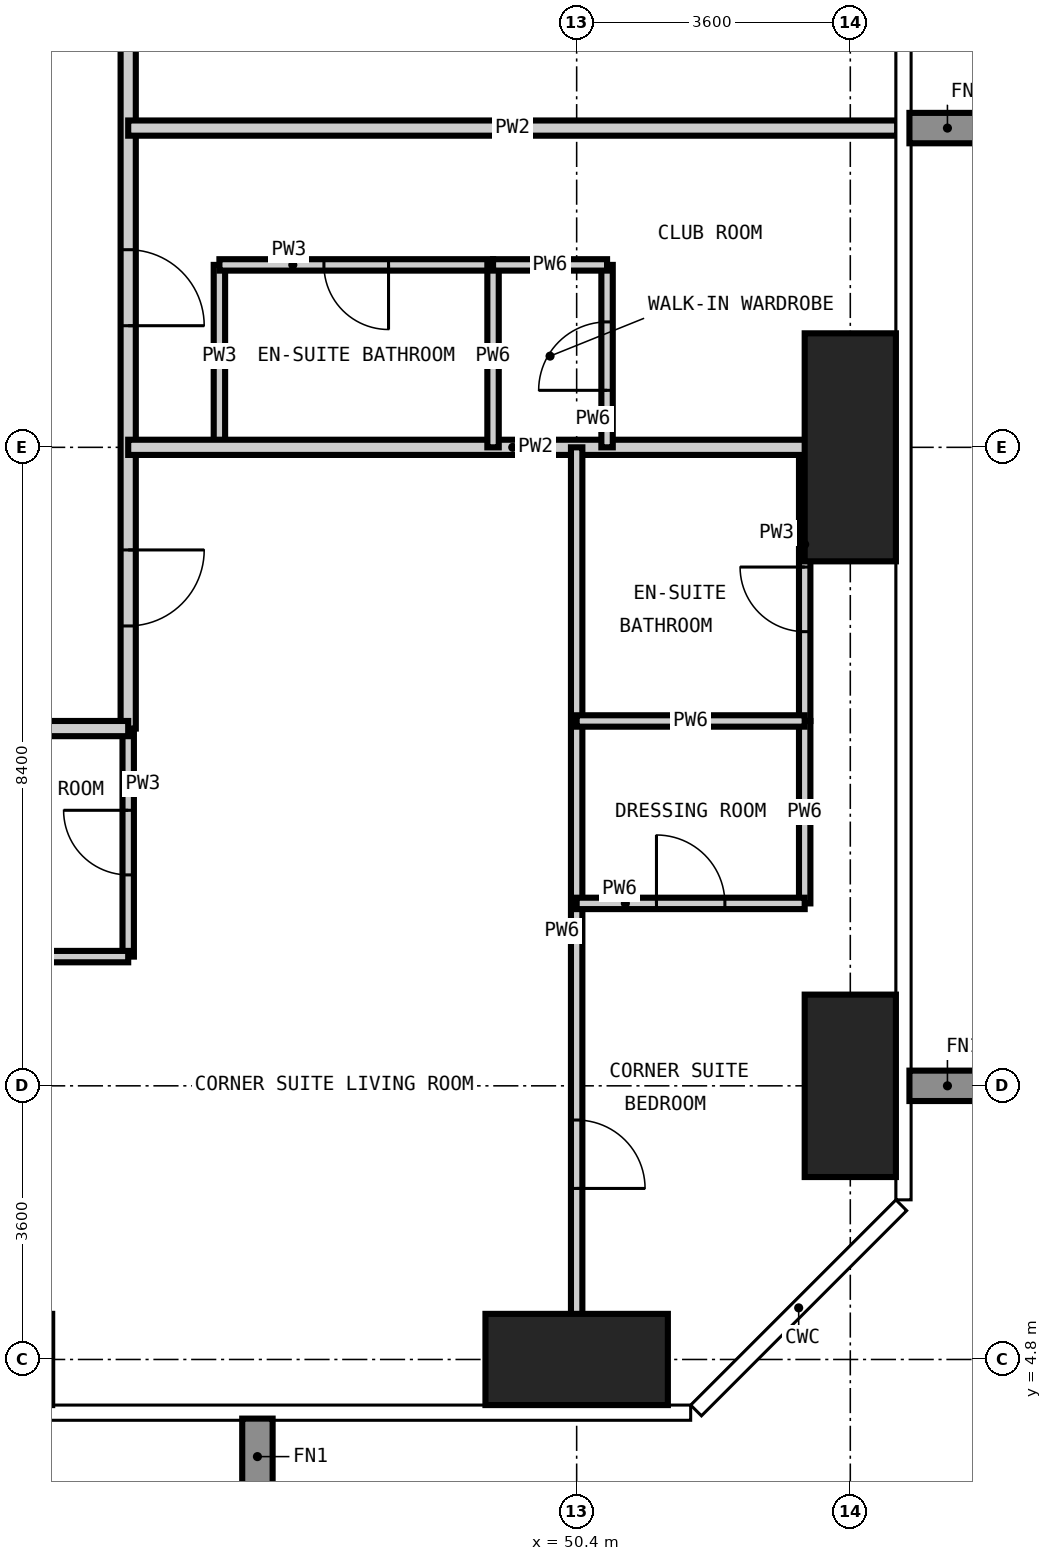
"""IFC4 building model, lengths in metres.
Left out: names, types, materials, properties, quantities, classifications, styles, units other than length and angle.
Written with IfcOpenShell. Run it as: python <this file> out.ifc"""

import sys

from ifc_helpers import new_model, si_unit, direction, frame, frame_2d, origin, origin_2d, place, context, subcontext, project, spatial, rectangle, extrude, element, fill, save


model = new_model("IFC4")
c1 = context("Model", 3, precision=1e-05, world=origin(), true_north=direction((0.0, 1.0)))
c2 = subcontext(c1, "Body", "Model", "MODEL_VIEW")
j1 = project(units=[si_unit("LENGTHUNIT", "METRE"), si_unit("PLANEANGLEUNIT", "RADIAN")], contexts=[c1])
p1 = place(None, origin())
s1 = spatial("IfcSite", under=j1, at=p1, CompositionType="ELEMENT")
p2 = place(p1, origin())
s2 = spatial("IfcBuilding", under=s1, at=p2, CompositionType="ELEMENT")
p3 = place(p2, frame((0.0, 0.0, 216.6)))
s3 = spatial("IfcBuildingStorey", under=s2, at=p3, CompositionType="ELEMENT", Elevation=216.6)
p4 = place(p3, frame((50.4, 4.8, -0.35), z_axis=(0.0, 0.0, 1.0), x_axis=(1.0, 0.0, 0.0)))
e1 = element("IfcColumn", 1, at=p4, inside=s3, PredefinedType="COLUMN", context=c2, shape_type="SweptSolid", body=[
    extrude(rectangle(XDim=2.4, YDim=1.2, at=origin_2d()), origin(), (0.0, 0.0, 1.0), 3.55),
])
p5 = place(p3, frame((54.0, 8.4, -0.35), z_axis=(0.0, 0.0, 1.0), x_axis=(1.0, 0.0, 0.0)))
e2 = element("IfcColumn", 2, at=p5, inside=s3, PredefinedType="COLUMN", context=c2, shape_type="SweptSolid", body=[
    extrude(rectangle(XDim=1.2, YDim=2.4, at=origin_2d()), origin(), (0.0, 0.0, 1.0), 3.55),
])
p6 = place(p3, frame((54.0, 16.8, -0.35), z_axis=(0.0, 0.0, 1.0), x_axis=(1.0, 0.0, 0.0)))
e3 = element("IfcColumn", 3, at=p6, inside=s3, PredefinedType="COLUMN", context=c2, shape_type="SweptSolid", body=[
    extrude(rectangle(XDim=1.2, YDim=3.0, at=origin_2d()), origin(), (0.0, 0.0, 1.0), 3.55),
])
p7 = place(p3, frame((44.5, 10.1, 0.0), z_axis=(0.0, 0.0, 1.0), x_axis=(0.0, 1.0, 0.0)))
e4 = element("IfcWall", 4, at=p7, inside=s3, PredefinedType="PARTITIONING", context=c2, shape_type="SweptSolid", body=[
    extrude(rectangle(XDim=3.0, YDim=0.15, at=frame_2d((1.5, 0.0))), origin(), (0.0, 0.0, 1.0), 3.2),
])
p8 = place(p7, frame((1.075, 0.0, 0.0)))
e5 = element("IfcOpeningElement", 5, at=p8, cuts=e4, PredefinedType="OPENING", context=c2, shape_type="SweptSolid", body=[
    extrude(rectangle(XDim=0.85, YDim=2.1, at=frame_2d((0.425, 1.05))), frame((0.0, 0.085, 0.0), z_axis=(0.0, -1.0, 0.0), x_axis=(1.0, 0.0, 0.0)), (0.0, 0.0, 1.0), 0.17),
])
p9 = place(p3, frame((45.7, 16.8, 0.0), z_axis=(0.0, 0.0, 1.0), x_axis=(0.0, 1.0, 0.0)))
e6 = element("IfcWall", 6, at=p9, inside=s3, PredefinedType="PARTITIONING", context=c2, shape_type="SweptSolid", body=[
    extrude(rectangle(XDim=2.4, YDim=0.15, at=frame_2d((1.2, 0.0))), origin(), (0.0, 0.0, 1.0), 3.2),
])
p10 = place(p3, frame((53.4, 13.2, 0.0), z_axis=(0.0, 0.0, 1.0), x_axis=(0.0, 1.0, 0.0)))
e7 = element("IfcWall", 7, at=p10, inside=s3, PredefinedType="PARTITIONING", context=c2, shape_type="SweptSolid", body=[
    extrude(rectangle(XDim=3.6, YDim=0.15, at=frame_2d((1.8, 0.0))), origin(), (0.0, 0.0, 1.0), 3.2),
])
p11 = place(p10, frame((1.175, 0.0, 0.0)))
e8 = element("IfcOpeningElement", 8, at=p11, cuts=e7, PredefinedType="OPENING", context=c2, shape_type="SweptSolid", body=[
    extrude(rectangle(XDim=0.85, YDim=2.1, at=frame_2d((0.425, 1.05))), frame((0.0, 0.085, 0.0), z_axis=(0.0, -1.0, 0.0), x_axis=(1.0, 0.0, 0.0)), (0.0, 0.0, 1.0), 0.17),
])
p12 = place(p3, frame((42.0, 10.1, 0.0), z_axis=(0.0, 0.0, 1.0), x_axis=(1.0, 0.0, 0.0)))
e9 = element("IfcWall", 9, at=p12, inside=s3, PredefinedType="PARTITIONING", context=c2, shape_type="SweptSolid", body=[
    extrude(rectangle(XDim=2.5, YDim=0.15, at=frame_2d((1.25, 0.0))), origin(), (0.0, 0.0, 1.0), 3.2),
])
p13 = place(p3, frame((45.7, 19.2, 0.0), z_axis=(0.0, 0.0, 1.0), x_axis=(1.0, 0.0, 0.0)))
e10 = element("IfcWall", 10, at=p13, inside=s3, PredefinedType="PARTITIONING", context=c2, shape_type="SweptSolid", body=[
    extrude(rectangle(XDim=3.6, YDim=0.15, at=frame_2d((1.8, 0.0))), origin(), (0.0, 0.0, 1.0), 3.2),
])
p14 = place(p13, frame((1.375, 0.0, 0.0)))
e11 = element("IfcOpeningElement", 11, at=p14, cuts=e10, PredefinedType="OPENING", context=c2, shape_type="SweptSolid", body=[
    extrude(rectangle(XDim=0.85, YDim=2.1, at=frame_2d((0.425, 1.05))), frame((0.0, 0.085, 0.0), z_axis=(0.0, -1.0, 0.0), x_axis=(1.0, 0.0, 0.0)), (0.0, 0.0, 1.0), 0.17),
])
p15 = place(p3, frame((44.5, 45.1, 0.0), z_axis=(0.0, 0.0, 1.0), x_axis=(0.0, -1.0, 0.0)))
e12 = element("IfcWall", 12, at=p15, inside=s3, PredefinedType="PARTITIONING", context=c2, shape_type="SweptSolid", body=[
    extrude(rectangle(XDim=32.0, YDim=0.2, at=frame_2d((16.0, 0.0))), origin(), (0.0, 0.0, 1.0), 3.2),
])
p16 = place(p15, frame((25.7, 0.0, 0.0)))
e13 = element("IfcOpeningElement", 13, at=p16, cuts=e12, PredefinedType="OPENING", context=c2, shape_type="SweptSolid", body=[
    extrude(rectangle(XDim=1.0, YDim=2.2, at=frame_2d((0.5, 1.1))), frame((0.0, 0.11, 0.0), z_axis=(0.0, -1.0, 0.0), x_axis=(1.0, 0.0, 0.0)), (0.0, 0.0, 1.0), 0.22),
])
p17 = place(p15, frame((19.4, 0.0, 0.0)))
e14 = element("IfcOpeningElement", 14, at=p17, cuts=e12, PredefinedType="OPENING", context=c2, shape_type="SweptSolid", body=[
    extrude(rectangle(XDim=1.0, YDim=2.2, at=frame_2d((0.5, 1.1))), frame((0.0, 0.11, 0.0), z_axis=(0.0, -1.0, 0.0), x_axis=(1.0, 0.0, 0.0)), (0.0, 0.0, 1.0), 0.22),
])
p18 = place(p15, frame((11.0, 0.0, 0.0)))
e15 = element("IfcOpeningElement", 15, at=p18, cuts=e12, PredefinedType="OPENING", context=c2, shape_type="SweptSolid", body=[
    extrude(rectangle(XDim=1.0, YDim=2.2, at=frame_2d((0.5, 1.1))), frame((0.0, 0.11, 0.0), z_axis=(0.0, -1.0, 0.0), x_axis=(1.0, 0.0, 0.0)), (0.0, 0.0, 1.0), 0.22),
])
p19 = place(p15, frame((4.7, 0.0, 0.0)))
e16 = element("IfcOpeningElement", 16, at=p19, cuts=e12, PredefinedType="OPENING", context=c2, shape_type="SweptSolid", body=[
    extrude(rectangle(XDim=1.0, YDim=2.2, at=frame_2d((0.5, 1.1))), frame((0.0, 0.11, 0.0), z_axis=(0.0, -1.0, 0.0), x_axis=(1.0, 0.0, 0.0)), (0.0, 0.0, 1.0), 0.22),
])
p20 = place(p15, frame((29.65, 0.0, 0.0)))
e17 = element("IfcOpeningElement", 17, at=p20, cuts=e12, PredefinedType="OPENING", context=c2, shape_type="SweptSolid", body=[
    extrude(rectangle(XDim=1.0, YDim=2.2, at=frame_2d((0.5, 1.1))), frame((0.0, 0.11, 0.0), z_axis=(0.0, -1.0, 0.0), x_axis=(1.0, 0.0, 0.0)), (0.0, 0.0, 1.0), 0.22),
])
p21 = place(p15, frame((1.05, 0.0, 0.0)))
e18 = element("IfcOpeningElement", 18, at=p21, cuts=e12, PredefinedType="OPENING", context=c2, shape_type="SweptSolid", body=[
    extrude(rectangle(XDim=1.0, YDim=2.2, at=frame_2d((0.5, 1.1))), frame((0.0, 0.11, 0.0), z_axis=(0.0, -1.0, 0.0), x_axis=(1.0, 0.0, 0.0)), (0.0, 0.0, 1.0), 0.22),
])
p22 = place(p3, frame((44.5, 13.1, 0.0), z_axis=(0.0, 0.0, 1.0), x_axis=(-1.0, 0.0, 0.0)))
e19 = element("IfcWall", 19, at=p22, inside=s3, PredefinedType="PARTITIONING", context=c2, shape_type="SweptSolid", body=[
    extrude(rectangle(XDim=31.4, YDim=0.2, at=frame_2d((15.7, 0.0))), origin(), (0.0, 0.0, 1.0), 3.2),
])
p23 = place(p22, frame((24.2, 0.0, 0.0)))
e20 = element("IfcOpeningElement", 20, at=p23, cuts=e19, PredefinedType="OPENING", context=c2, shape_type="SweptSolid", body=[
    extrude(rectangle(XDim=1.0, YDim=2.2, at=frame_2d((0.5, 1.1))), frame((0.0, 0.11, 0.0), z_axis=(0.0, -1.0, 0.0), x_axis=(1.0, 0.0, 0.0)), (0.0, 0.0, 1.0), 0.22),
])
p24 = place(p22, frame((13.4, 0.0, 0.0)))
e21 = element("IfcOpeningElement", 21, at=p24, cuts=e19, PredefinedType="OPENING", context=c2, shape_type="SweptSolid", body=[
    extrude(rectangle(XDim=1.0, YDim=2.2, at=frame_2d((0.5, 1.1))), frame((0.0, 0.11, 0.0), z_axis=(0.0, -1.0, 0.0), x_axis=(1.0, 0.0, 0.0)), (0.0, 0.0, 1.0), 0.22),
])
p25 = place(p22, frame((7.4, 0.0, 0.0)))
e22 = element("IfcOpeningElement", 22, at=p25, cuts=e19, PredefinedType="OPENING", context=c2, shape_type="SweptSolid", body=[
    extrude(rectangle(XDim=1.0, YDim=2.2, at=frame_2d((0.5, 1.1))), frame((0.0, 0.11, 0.0), z_axis=(0.0, -1.0, 0.0), x_axis=(1.0, 0.0, 0.0)), (0.0, 0.0, 1.0), 0.22),
])
for number, where, z_axis, x_axis in (
    (23, (44.5, 16.8, 0.0), (0.0, 0.0, 1.0), (1.0, 0.0, 0.0)),
    (24, (44.5, 21.0, 0.0), (0.0, 0.0, 1.0), (1.0, 0.0, 0.0)),
):
    element("IfcWall", number, at=place(p3, frame(where, z_axis=z_axis, x_axis=x_axis)), inside=s3, PredefinedType="PARTITIONING", context=c2, shape_type="SweptSolid", body=[
        extrude(rectangle(XDim=10.118, YDim=0.2, at=frame_2d((5.059, 0.0))), origin(), (0.0, 0.0, 1.0), 3.2),
    ])
p26 = place(p3, frame((49.3, 16.8, 0.0), z_axis=(0.0, 0.0, 1.0), x_axis=(0.0, 1.0, 0.0)))
e25 = element("IfcWall", 25, at=p26, inside=s3, PredefinedType="PARTITIONING", context=c2, shape_type="SweptSolid", body=[
    extrude(rectangle(XDim=2.4, YDim=0.15, at=frame_2d((1.2, 0.0))), origin(), (0.0, 0.0, 1.0), 3.2),
])
p27 = place(p3, frame((50.4, 4.182, 0.0), z_axis=(0.0, 0.0, 1.0), x_axis=(0.0, 1.0, 0.0)))
e26 = element("IfcWall", 26, at=p27, inside=s3, PredefinedType="PARTITIONING", context=c2, shape_type="SweptSolid", body=[
    extrude(rectangle(XDim=12.618, YDim=0.15, at=frame_2d((6.309, 0.0))), origin(), (0.0, 0.0, 1.0), 3.2),
])
p28 = place(p27, frame((2.868, 0.0, 0.0)))
e27 = element("IfcOpeningElement", 27, at=p28, cuts=e26, PredefinedType="OPENING", context=c2, shape_type="SweptSolid", body=[
    extrude(rectangle(XDim=0.9, YDim=2.1, at=frame_2d((0.45, 1.05))), frame((0.0, 0.085, 0.0), z_axis=(0.0, -1.0, 0.0), x_axis=(1.0, 0.0, 0.0)), (0.0, 0.0, 1.0), 0.17),
])
p29 = place(p3, frame((50.8, 16.8, 0.0), z_axis=(0.0, 0.0, 1.0), x_axis=(0.0, 1.0, 0.0)))
e28 = element("IfcWall", 28, at=p29, inside=s3, PredefinedType="PARTITIONING", context=c2, shape_type="SweptSolid", body=[
    extrude(rectangle(XDim=2.4, YDim=0.15, at=frame_2d((1.2, 0.0))), origin(), (0.0, 0.0, 1.0), 3.2),
])
p30 = place(p29, frame((0.75, 0.0, 0.0)))
e29 = element("IfcOpeningElement", 29, at=p30, cuts=e28, PredefinedType="OPENING", context=c2, shape_type="SweptSolid", body=[
    extrude(rectangle(XDim=0.9, YDim=2.1, at=frame_2d((0.45, 1.05))), frame((0.0, 0.085, 0.0), z_axis=(0.0, -1.0, 0.0), x_axis=(1.0, 0.0, 0.0)), (0.0, 0.0, 1.0), 0.17),
])
p31 = place(p3, frame((53.4, 10.8, 0.0), z_axis=(0.0, 0.0, 1.0), x_axis=(0.0, 1.0, 0.0)))
e30 = element("IfcWall", 30, at=p31, inside=s3, PredefinedType="PARTITIONING", context=c2, shape_type="SweptSolid", body=[
    extrude(rectangle(XDim=2.4, YDim=0.15, at=frame_2d((1.2, 0.0))), origin(), (0.0, 0.0, 1.0), 3.2),
])
p32 = place(p3, frame((50.4, 10.8, 0.0), z_axis=(0.0, 0.0, 1.0), x_axis=(1.0, 0.0, 0.0)))
e31 = element("IfcWall", 31, at=p32, inside=s3, PredefinedType="PARTITIONING", context=c2, shape_type="SweptSolid", body=[
    extrude(rectangle(XDim=3.0, YDim=0.15, at=frame_2d((1.5, 0.0))), origin(), (0.0, 0.0, 1.0), 3.2),
])
p33 = place(p32, frame((1.05, 0.0, 0.0)))
e32 = element("IfcOpeningElement", 32, at=p33, cuts=e31, PredefinedType="OPENING", context=c2, shape_type="SweptSolid", body=[
    extrude(rectangle(XDim=0.9, YDim=2.1, at=frame_2d((0.45, 1.05))), frame((0.0, 0.085, 0.0), z_axis=(0.0, -1.0, 0.0), x_axis=(1.0, 0.0, 0.0)), (0.0, 0.0, 1.0), 0.17),
])
p34 = place(p3, frame((50.4, 13.2, 0.0), z_axis=(0.0, 0.0, 1.0), x_axis=(1.0, 0.0, 0.0)))
e33 = element("IfcWall", 33, at=p34, inside=s3, PredefinedType="PARTITIONING", context=c2, shape_type="SweptSolid", body=[
    extrude(rectangle(XDim=3.0, YDim=0.15, at=frame_2d((1.5, 0.0))), origin(), (0.0, 0.0, 1.0), 3.2),
])
p35 = place(p3, frame((49.3, 19.2, 0.0), z_axis=(0.0, 0.0, 1.0), x_axis=(1.0, 0.0, 0.0)))
e34 = element("IfcWall", 34, at=p35, inside=s3, PredefinedType="PARTITIONING", context=c2, shape_type="SweptSolid", body=[
    extrude(rectangle(XDim=1.5, YDim=0.15, at=frame_2d((0.75, 0.0))), origin(), (0.0, 0.0, 1.0), 3.2),
])
p36 = place(p16, origin())
e35 = element("IfcDoor", 35, at=p36, inside=s3, OperationType="SINGLE_SWING_RIGHT", PredefinedType="DOOR", context=c2, shape_type="SweptSolid", body=[
    extrude(rectangle(XDim=1.0, YDim=2.2, at=frame_2d((0.5, 1.1))), frame((0.0, 0.025, 0.0), z_axis=(0.0, -1.0, 0.0), x_axis=(1.0, 0.0, 0.0)), (0.0, 0.0, 1.0), 0.05),
])
fill(e13, e35)
p37 = place(p14, frame((0.85, 0.0, 0.0), z_axis=(0.0, 0.0, 1.0), x_axis=(-1.0, 0.0, 0.0)))
e36 = element("IfcDoor", 36, at=p37, inside=s3, OperationType="SINGLE_SWING_LEFT", PredefinedType="DOOR", context=c2, shape_type="SweptSolid", body=[
    extrude(rectangle(XDim=0.85, YDim=2.1, at=frame_2d((0.425, 1.05))), frame((0.0, 0.025, 0.0), z_axis=(0.0, -1.0, 0.0), x_axis=(1.0, 0.0, 0.0)), (0.0, 0.0, 1.0), 0.05),
])
fill(e11, e36)
p38 = place(p30, origin())
e37 = element("IfcDoor", 37, at=p38, inside=s3, OperationType="SINGLE_SWING_LEFT", PredefinedType="DOOR", context=c2, shape_type="SweptSolid", body=[
    extrude(rectangle(XDim=0.9, YDim=2.1, at=frame_2d((0.45, 1.05))), frame((0.0, 0.025, 0.0), z_axis=(0.0, -1.0, 0.0), x_axis=(1.0, 0.0, 0.0)), (0.0, 0.0, 1.0), 0.05),
])
fill(e29, e37)
p39 = place(p20, origin())
e38 = element("IfcDoor", 38, at=p39, inside=s3, OperationType="SINGLE_SWING_LEFT", PredefinedType="DOOR", context=c2, shape_type="SweptSolid", body=[
    extrude(rectangle(XDim=1.0, YDim=2.2, at=frame_2d((0.5, 1.1))), frame((0.0, 0.025, 0.0), z_axis=(0.0, -1.0, 0.0), x_axis=(1.0, 0.0, 0.0)), (0.0, 0.0, 1.0), 0.05),
])
fill(e17, e38)
p40 = place(p8, origin())
e39 = element("IfcDoor", 39, at=p40, inside=s3, OperationType="SINGLE_SWING_RIGHT", PredefinedType="DOOR", context=c2, shape_type="SweptSolid", body=[
    extrude(rectangle(XDim=0.85, YDim=2.1, at=frame_2d((0.425, 1.05))), frame((0.0, 0.025, 0.0), z_axis=(0.0, -1.0, 0.0), x_axis=(1.0, 0.0, 0.0)), (0.0, 0.0, 1.0), 0.05),
])
fill(e5, e39)
p41 = place(p28, frame((0.9, 0.0, 0.0), z_axis=(0.0, 0.0, 1.0), x_axis=(-1.0, 0.0, 0.0)))
e40 = element("IfcDoor", 40, at=p41, inside=s3, OperationType="SINGLE_SWING_RIGHT", PredefinedType="DOOR", context=c2, shape_type="SweptSolid", body=[
    extrude(rectangle(XDim=0.9, YDim=2.1, at=frame_2d((0.45, 1.05))), frame((0.0, 0.025, 0.0), z_axis=(0.0, -1.0, 0.0), x_axis=(1.0, 0.0, 0.0)), (0.0, 0.0, 1.0), 0.05),
])
fill(e27, e40)
p42 = place(p11, origin())
e41 = element("IfcDoor", 41, at=p42, inside=s3, OperationType="SINGLE_SWING_RIGHT", PredefinedType="DOOR", context=c2, shape_type="SweptSolid", body=[
    extrude(rectangle(XDim=0.85, YDim=2.1, at=frame_2d((0.425, 1.05))), frame((0.0, 0.025, 0.0), z_axis=(0.0, -1.0, 0.0), x_axis=(1.0, 0.0, 0.0)), (0.0, 0.0, 1.0), 0.05),
])
fill(e8, e41)
p43 = place(p33, origin())
e42 = element("IfcDoor", 42, at=p43, inside=s3, OperationType="SINGLE_SWING_LEFT", PredefinedType="DOOR", context=c2, shape_type="SweptSolid", body=[
    extrude(rectangle(XDim=0.9, YDim=2.1, at=frame_2d((0.45, 1.05))), frame((0.0, 0.025, 0.0), z_axis=(0.0, -1.0, 0.0), x_axis=(1.0, 0.0, 0.0)), (0.0, 0.0, 1.0), 0.05),
])
fill(e32, e42)
save(model, sys.argv[1])
